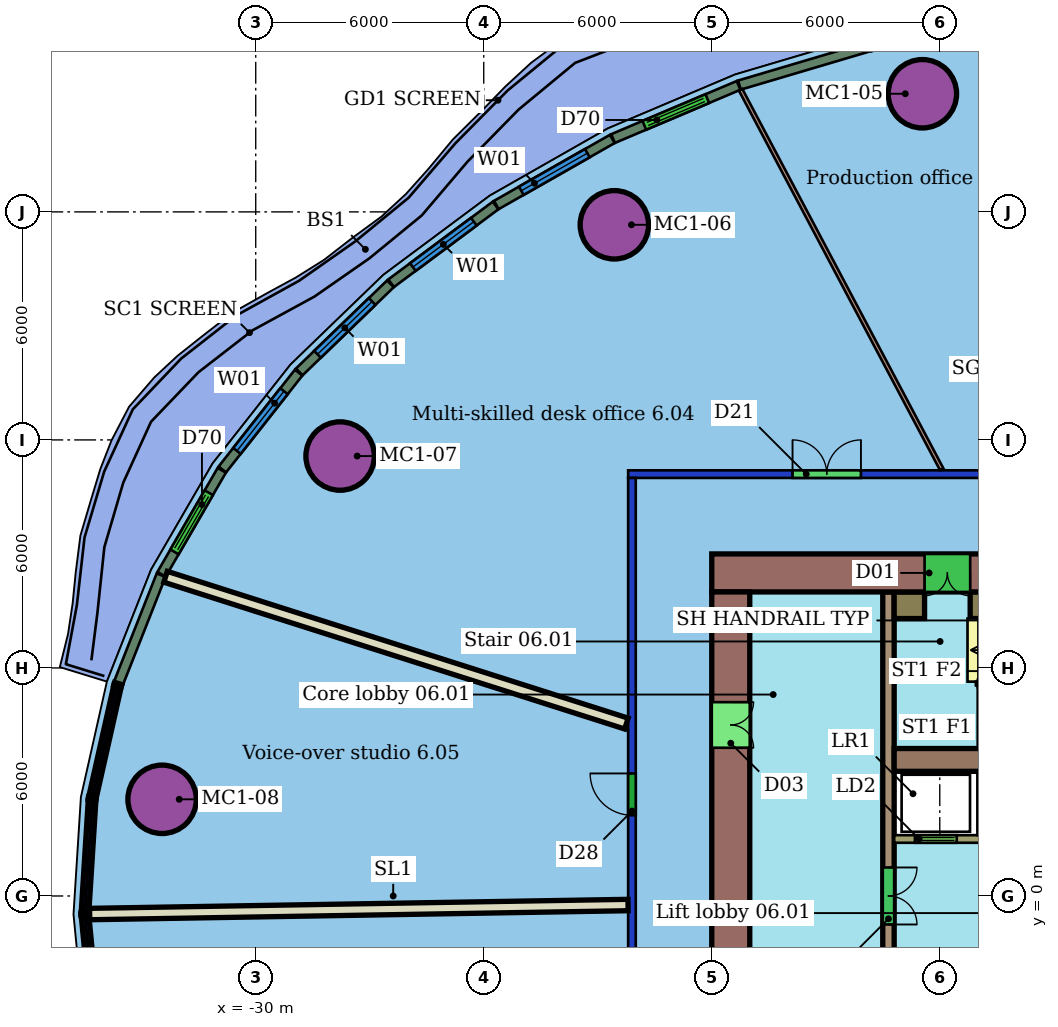
"""IFC4 building model, lengths in metres.
Left out: names, types, materials, properties, quantities, classifications, styles, units other than length and angle.
Written with IfcOpenShell. Run it as: python <this file> out.ifc"""

import sys

from ifc_helpers import new_model, si_unit, direction, frame, frame_2d, origin, origin_2d, place, context, subcontext, project, spatial, rectangle, hollow_circle, extrude, element, fill, save


model = new_model("IFC4")
c1 = context("Model", 3, precision=1e-05, world=origin(), true_north=direction((0.0, 1.0)))
c2 = subcontext(c1, "Body", "Model", "MODEL_VIEW")
j1 = project(units=[si_unit("LENGTHUNIT", "METRE"), si_unit("PLANEANGLEUNIT", "RADIAN")], contexts=[c1])
p1 = place(None, origin())
s1 = spatial("IfcSite", under=j1, at=p1, CompositionType="ELEMENT")
p2 = place(p1, origin())
s2 = spatial("IfcBuilding", under=s1, at=p2, CompositionType="ELEMENT")
p3 = place(p2, frame((0.0, 0.0, 39.7)))
s3 = spatial("IfcBuildingStorey", under=s2, at=p3, CompositionType="ELEMENT", Elevation=39.7)
for number, where, z_axis, x_axis in (
    (1, (-12.458, 21.108, 0.0), (0.0, 0.0, 1.0), (1.0, 0.0, 0.0)),
    (2, (-20.563, 17.66, 0.0), (0.0, 0.0, 1.0), (1.0, 0.0, 0.0)),
    (3, (-27.78, 11.576, 0.0), (0.0, 0.0, 1.0), (1.0, 0.0, 0.0)),
    (4, (-32.464, 2.543, 0.0), (0.0, 0.0, 1.0), (1.0, 0.0, 0.0)),
):
    element("IfcColumn", number, at=place(p3, frame(where, z_axis=z_axis, x_axis=x_axis)), inside=s3, PredefinedType="COLUMN", context=c2, shape_type="SweptSolid", body=[
        extrude(hollow_circle(Radius=0.9, WallThickness=0.06, at=origin_2d()), origin(), (0.0, 0.0, 1.0), 3.55),
    ])
p4 = place(p3, frame((-20.1, -11.0, 0.0), z_axis=(0.0, 0.0, 1.0), x_axis=(0.0, 1.0, 0.0)))
e5 = element("IfcWall", 5, at=p4, inside=s3, PredefinedType="PARTITIONING", context=c2, shape_type="SweptSolid", body=[
    extrude(rectangle(XDim=22.0, YDim=0.2, at=frame_2d((11.0, 0.0))), origin(), (0.0, 0.0, 1.0), 2.85),
])
p5 = place(p4, frame((13.124, 0.0, 0.0)))
e6 = element("IfcOpeningElement", 6, at=p5, cuts=e5, PredefinedType="OPENING", context=c2, shape_type="SweptSolid", body=[
    extrude(rectangle(XDim=1.1, YDim=2.1, at=frame_2d((0.55, 1.05))), frame((0.0, 0.11, 0.0), z_axis=(0.0, -1.0, 0.0), x_axis=(1.0, 0.0, 0.0)), (0.0, 0.0, 1.0), 0.22),
])
p6 = place(p4, frame((6.013, 0.0, 0.0)))
e7 = element("IfcOpeningElement", 7, at=p6, cuts=e5, PredefinedType="OPENING", context=c2, shape_type="SweptSolid", body=[
    extrude(rectangle(XDim=1.8, YDim=2.1, at=frame_2d((0.9, 1.05))), frame((0.0, 0.11, 0.0), z_axis=(0.0, -1.0, 0.0), x_axis=(1.0, 0.0, 0.0)), (0.0, 0.0, 1.0), 0.22),
])
p7 = place(p3, frame((-20.2, 11.1, 0.0), z_axis=(0.0, 0.0, 1.0), x_axis=(1.0, 0.0, 0.0)))
e8 = element("IfcWall", 8, at=p7, inside=s3, PredefinedType="PARTITIONING", context=c2, shape_type="SweptSolid", body=[
    extrude(rectangle(XDim=28.4, YDim=0.2, at=frame_2d((14.2, 0.0))), origin(), (0.0, 0.0, 1.0), 2.85),
])
p8 = place(p7, frame((16.718, 0.0, 0.0)))
e9 = element("IfcOpeningElement", 9, at=p8, cuts=e8, PredefinedType="OPENING", context=c2, shape_type="SweptSolid", body=[
    extrude(rectangle(XDim=1.8, YDim=2.1, at=frame_2d((0.9, 1.05))), frame((0.0, 0.11, 0.0), z_axis=(0.0, -1.0, 0.0), x_axis=(1.0, 0.0, 0.0)), (0.0, 0.0, 1.0), 0.22),
])
p9 = place(p7, frame((9.305, 0.0, 0.0)))
e10 = element("IfcOpeningElement", 10, at=p9, cuts=e8, PredefinedType="OPENING", context=c2, shape_type="SweptSolid", body=[
    extrude(rectangle(XDim=1.0, YDim=2.1, at=frame_2d((0.5, 1.05))), frame((0.0, 0.11, 0.0), z_axis=(0.0, -1.0, 0.0), x_axis=(1.0, 0.0, 0.0)), (0.0, 0.0, 1.0), 0.22),
])
p10 = place(p7, frame((4.326, 0.0, 0.0)))
e11 = element("IfcOpeningElement", 11, at=p10, cuts=e8, PredefinedType="OPENING", context=c2, shape_type="SweptSolid", body=[
    extrude(rectangle(XDim=1.8, YDim=2.1, at=frame_2d((0.9, 1.05))), frame((0.0, 0.11, 0.0), z_axis=(0.0, -1.0, 0.0), x_axis=(1.0, 0.0, 0.0)), (0.0, 0.0, 1.0), 0.22),
])
p11 = place(p3, frame((-17.241, 21.215, 0.0), z_axis=(0.0, 0.0, 1.0), x_axis=(0.468204132098, -0.883620331752, 0.0)))
e12 = element("IfcWall", 12, at=p11, inside=s3, PredefinedType="PARTITIONING", context=c2, shape_type="SweptSolid", body=[
    extrude(rectangle(XDim=11.308, YDim=0.1, at=frame_2d((5.654, 0.0))), origin(), (0.0, 0.0, 1.0), 3.55),
])
p12 = place(p3, frame((-32.372, 8.399, 0.0), z_axis=(0.0, 0.0, 1.0), x_axis=(0.952850421319, -0.303440397101, 0.0)))
e13 = element("IfcWall", 13, at=p12, inside=s3, PredefinedType="PARTITIONING", context=c2, shape_type="SweptSolid", body=[
    extrude(rectangle(XDim=12.727, YDim=0.3, at=frame_2d((6.363, 0.0))), origin(), (0.0, 0.0, 1.0), 3.55),
])
p13 = place(p3, frame((-34.37, -0.475, 0.0), z_axis=(0.0, 0.0, 1.0), x_axis=(0.999859758648, 0.016747030697, 0.0)))
e14 = element("IfcWall", 14, at=p13, inside=s3, PredefinedType="PARTITIONING", context=c2, shape_type="SweptSolid", body=[
    extrude(rectangle(XDim=14.17, YDim=0.3, at=frame_2d((7.085, 0.0))), origin(), (0.0, 0.0, 1.0), 3.55),
])
p14 = place(p3, frame((-13.818, 22.36, 0.0), z_axis=(0.0, 0.0, 1.0), x_axis=(-0.958796062101, -0.284095250399, 0.0)))
e15 = element("IfcWall", 15, at=p14, inside=s3, PredefinedType="SOLIDWALL", context=c2, shape_type="SweptSolid", body=[
    extrude(rectangle(XDim=3.603, YDim=0.25, at=frame_2d((1.802, 0.0))), origin(), (0.0, 0.0, 1.0), 3.15),
])
p15 = place(p3, frame((-17.294, 21.329, 0.0), z_axis=(0.0, 0.0, 1.0), x_axis=(-0.920777409004, -0.390088404169, 0.0)))
e16 = element("IfcWall", 16, at=p15, inside=s3, PredefinedType="SOLIDWALL", context=c2, shape_type="SweptSolid", body=[
    extrude(rectangle(XDim=3.587, YDim=0.25, at=frame_2d((1.794, 0.0))), origin(), (0.0, 0.0, 1.0), 3.15),
])
p16 = place(p15, frame((0.894, 0.0, 0.0)))
e17 = element("IfcOpeningElement", 17, at=p16, cuts=e16, PredefinedType="OPENING", context=c2, shape_type="SweptSolid", body=[
    extrude(rectangle(XDim=1.8, YDim=2.4, at=frame_2d((0.9, 1.2))), frame((0.0, 0.135, 0.0), z_axis=(0.0, -1.0, 0.0), x_axis=(1.0, 0.0, 0.0)), (0.0, 0.0, 1.0), 0.27),
])
p17 = place(p3, frame((-20.617, 19.919, 0.0), z_axis=(0.0, 0.0, 1.0), x_axis=(-0.868943789931, -0.494910789881, 0.0)))
e18 = element("IfcWall", 18, at=p17, inside=s3, PredefinedType="SOLIDWALL", context=c2, shape_type="SweptSolid", body=[
    extrude(rectangle(XDim=3.512, YDim=0.25, at=frame_2d((1.756, 0.0))), origin(), (0.0, 0.0, 1.0), 3.15),
])
p18 = place(p17, frame((0.756, 0.0, 0.8)))
e19 = element("IfcOpeningElement", 19, at=p18, cuts=e18, PredefinedType="OPENING", context=c2, shape_type="SweptSolid", body=[
    extrude(rectangle(XDim=2.0, YDim=2.2, at=frame_2d((1.0, 1.1))), frame((0.0, 0.135, 0.0), z_axis=(0.0, -1.0, 0.0), x_axis=(1.0, 0.0, 0.0)), (0.0, 0.0, 1.0), 0.27),
])
p19 = place(p3, frame((-23.689, 18.168, 0.0), z_axis=(0.0, 0.0, 1.0), x_axis=(-0.802166551417, -0.597100346498, 0.0)))
e20 = element("IfcWall", 20, at=p19, inside=s3, PredefinedType="SOLIDWALL", context=c2, shape_type="SweptSolid", body=[
    extrude(rectangle(XDim=3.426, YDim=0.25, at=frame_2d((1.713, 0.0))), origin(), (0.0, 0.0, 1.0), 3.15),
])
p20 = place(p19, frame((0.713, 0.0, 0.8)))
e21 = element("IfcOpeningElement", 21, at=p20, cuts=e20, PredefinedType="OPENING", context=c2, shape_type="SweptSolid", body=[
    extrude(rectangle(XDim=2.0, YDim=2.2, at=frame_2d((1.0, 1.1))), frame((0.0, 0.135, 0.0), z_axis=(0.0, -1.0, 0.0), x_axis=(1.0, 0.0, 0.0)), (0.0, 0.0, 1.0), 0.27),
])
p21 = place(p3, frame((-26.456, 16.107, 0.0), z_axis=(0.0, 0.0, 1.0), x_axis=(-0.719152952807, -0.694851804682, 0.0)))
e22 = element("IfcWall", 22, at=p21, inside=s3, PredefinedType="SOLIDWALL", context=c2, shape_type="SweptSolid", body=[
    extrude(rectangle(XDim=3.335, YDim=0.25, at=frame_2d((1.668, 0.0))), origin(), (0.0, 0.0, 1.0), 3.15),
])
p22 = place(p21, frame((0.668, 0.0, 0.8)))
e23 = element("IfcOpeningElement", 23, at=p22, cuts=e22, PredefinedType="OPENING", context=c2, shape_type="SweptSolid", body=[
    extrude(rectangle(XDim=2.0, YDim=2.2, at=frame_2d((1.0, 1.1))), frame((0.0, 0.135, 0.0), z_axis=(0.0, -1.0, 0.0), x_axis=(1.0, 0.0, 0.0)), (0.0, 0.0, 1.0), 0.27),
])
p23 = place(p3, frame((-28.871, 13.771, 0.0), z_axis=(0.0, 0.0, 1.0), x_axis=(-0.618897546754, -0.785471722357, 0.0)))
e24 = element("IfcWall", 24, at=p23, inside=s3, PredefinedType="SOLIDWALL", context=c2, shape_type="SweptSolid", body=[
    extrude(rectangle(XDim=3.245, YDim=0.25, at=frame_2d((1.623, 0.0))), origin(), (0.0, 0.0, 1.0), 3.15),
])
p24 = place(p23, frame((0.622, 0.0, 0.8)))
e25 = element("IfcOpeningElement", 25, at=p24, cuts=e24, PredefinedType="OPENING", context=c2, shape_type="SweptSolid", body=[
    extrude(rectangle(XDim=2.0, YDim=2.2, at=frame_2d((1.0, 1.1))), frame((0.0, 0.135, 0.0), z_axis=(0.0, -1.0, 0.0), x_axis=(1.0, 0.0, 0.0)), (0.0, 0.0, 1.0), 0.27),
])
p25 = place(p3, frame((-30.894, 11.2, 0.0), z_axis=(0.0, 0.0, 1.0), x_axis=(-0.501203693301, -0.86532933489, 0.0)))
e26 = element("IfcWall", 26, at=p25, inside=s3, PredefinedType="SOLIDWALL", context=c2, shape_type="SweptSolid", body=[
    extrude(rectangle(XDim=3.161, YDim=0.25, at=frame_2d((1.581, 0.0))), origin(), (0.0, 0.0, 1.0), 3.15),
])
p26 = place(p25, frame((0.681, 0.0, 0.0)))
e27 = element("IfcOpeningElement", 27, at=p26, cuts=e26, PredefinedType="OPENING", context=c2, shape_type="SweptSolid", body=[
    extrude(rectangle(XDim=1.8, YDim=2.4, at=frame_2d((0.9, 1.2))), frame((0.0, 0.135, 0.0), z_axis=(0.0, -1.0, 0.0), x_axis=(1.0, 0.0, 0.0)), (0.0, 0.0, 1.0), 0.27),
])
p27 = place(p3, frame((-32.49, 8.441, 0.0), z_axis=(0.0, 0.0, 1.0), x_axis=(-0.367150133135, -0.93016169548, 0.0)))
e28 = element("IfcWall", 28, at=p27, inside=s3, PredefinedType="SOLIDWALL", context=c2, shape_type="SweptSolid", body=[
    extrude(rectangle(XDim=3.05, YDim=0.25, at=frame_2d((1.525, 0.0))), origin(), (0.0, 0.0, 1.0), 3.15),
])
p28 = place(p3, frame((-6.0, 8.5, 0.0), z_axis=(0.0, 0.0, 1.0), x_axis=(-1.0, 0.0, 0.0)))
e29 = element("IfcWall", 29, at=p28, inside=s3, PredefinedType="SHEAR", context=c2, shape_type="SweptSolid", body=[
    extrude(rectangle(XDim=12.0, YDim=1.0, at=frame_2d((6.0, 0.0))), origin(), (0.0, 0.0, 1.0), 3.4),
])
p29 = place(p28, frame((5.2, 0.0, 0.0)))
e30 = element("IfcOpeningElement", 30, at=p29, cuts=e29, PredefinedType="OPENING", context=c2, shape_type="SweptSolid", body=[
    extrude(rectangle(XDim=1.2, YDim=2.1, at=frame_2d((0.6, 1.05))), frame((0.0, 0.51, 0.0), z_axis=(0.0, -1.0, 0.0), x_axis=(1.0, 0.0, 0.0)), (0.0, 0.0, 1.0), 1.02),
])
p30 = place(p3, frame((-17.5, 8.0, 0.0), z_axis=(0.0, 0.0, 1.0), x_axis=(0.0, -1.0, 0.0)))
e31 = element("IfcWall", 31, at=p30, inside=s3, PredefinedType="SHEAR", context=c2, shape_type="SweptSolid", body=[
    extrude(rectangle(XDim=16.0, YDim=1.0, at=frame_2d((8.0, 0.0))), origin(), (0.0, 0.0, 1.0), 3.4),
])
p31 = place(p30, frame((11.9, 0.0, 0.0)))
e32 = element("IfcOpeningElement", 32, at=p31, cuts=e31, PredefinedType="OPENING", context=c2, shape_type="SweptSolid", body=[
    extrude(rectangle(XDim=1.2, YDim=2.1, at=frame_2d((0.6, 1.05))), frame((0.0, 0.51, 0.0), z_axis=(0.0, -1.0, 0.0), x_axis=(1.0, 0.0, 0.0)), (0.0, 0.0, 1.0), 1.02),
])
p32 = place(p30, frame((2.9, 0.0, 0.0)))
e33 = element("IfcOpeningElement", 33, at=p32, cuts=e31, PredefinedType="OPENING", context=c2, shape_type="SweptSolid", body=[
    extrude(rectangle(XDim=1.2, YDim=2.1, at=frame_2d((0.6, 1.05))), frame((0.0, 0.51, 0.0), z_axis=(0.0, -1.0, 0.0), x_axis=(1.0, 0.0, 0.0)), (0.0, 0.0, 1.0), 1.02),
])
p33 = place(p3, frame((-13.2, 3.58, 0.0), z_axis=(0.0, 0.0, 1.0), x_axis=(1.0, 0.0, 0.0)))
e34 = element("IfcWall", 34, at=p33, inside=s3, PredefinedType="SHEAR", context=c2, shape_type="SweptSolid", body=[
    extrude(rectangle(XDim=7.2, YDim=0.6, at=frame_2d((3.6, 0.0))), origin(), (0.0, 0.0, 1.0), 3.4),
])
p34 = place(p3, frame((-13.35, 8.0, 0.0), z_axis=(0.0, 0.0, 1.0), x_axis=(0.0, -1.0, 0.0)))
e35 = element("IfcWall", 35, at=p34, inside=s3, PredefinedType="SHEAR", context=c2, shape_type="SweptSolid", body=[
    extrude(rectangle(XDim=16.0, YDim=0.3, at=frame_2d((8.0, 0.0))), origin(), (0.0, 0.0, 1.0), 3.4),
])
p35 = place(p34, frame((7.25, 0.0, 0.0)))
e36 = element("IfcOpeningElement", 36, at=p35, cuts=e35, PredefinedType="OPENING", context=c2, shape_type="SweptSolid", body=[
    extrude(rectangle(XDim=1.5, YDim=2.1, at=frame_2d((0.75, 1.05))), frame((0.0, 0.16, 0.0), z_axis=(0.0, -1.0, 0.0), x_axis=(1.0, 0.0, 0.0)), (0.0, 0.0, 1.0), 0.32),
])
p36 = place(p3, frame((-13.2, 1.5, 0.0), z_axis=(0.0, 0.0, 1.0), x_axis=(1.0, 0.0, 0.0)))
e37 = element("IfcWall", 37, at=p36, inside=s3, PredefinedType="SHEAR", context=c2, shape_type="SweptSolid", body=[
    extrude(rectangle(XDim=14.4, YDim=0.2, at=frame_2d((7.2, 0.0))), origin(), (0.0, 0.0, 1.0), 3.4),
])
p37 = place(p36, frame((0.546, 0.0, 0.0)))
e38 = element("IfcOpeningElement", 38, at=p37, cuts=e37, PredefinedType="OPENING", context=c2, shape_type="SweptSolid", body=[
    extrude(rectangle(XDim=1.1, YDim=2.1, at=frame_2d((0.55, 1.05))), frame((0.0, 0.11, 0.0), z_axis=(0.0, -1.0, 0.0), x_axis=(1.0, 0.0, 0.0)), (0.0, 0.0, 1.0), 0.22),
])
p38 = place(p36, frame((2.988, 0.0, 0.0)))
e39 = element("IfcOpeningElement", 39, at=p38, cuts=e37, PredefinedType="OPENING", context=c2, shape_type="SweptSolid", body=[
    extrude(rectangle(XDim=1.1, YDim=2.1, at=frame_2d((0.55, 1.05))), frame((0.0, 0.11, 0.0), z_axis=(0.0, -1.0, 0.0), x_axis=(1.0, 0.0, 0.0)), (0.0, 0.0, 1.0), 0.22),
])
p39 = place(p36, frame((5.429, 0.0, 0.0)))
e40 = element("IfcOpeningElement", 40, at=p39, cuts=e37, PredefinedType="OPENING", context=c2, shape_type="SweptSolid", body=[
    extrude(rectangle(XDim=1.1, YDim=2.1, at=frame_2d((0.55, 1.05))), frame((0.0, 0.11, 0.0), z_axis=(0.0, -1.0, 0.0), x_axis=(1.0, 0.0, 0.0)), (0.0, 0.0, 1.0), 0.22),
])
p40 = place(p36, frame((7.871, 0.0, 0.0)))
e41 = element("IfcOpeningElement", 41, at=p40, cuts=e37, PredefinedType="OPENING", context=c2, shape_type="SweptSolid", body=[
    extrude(rectangle(XDim=1.1, YDim=2.1, at=frame_2d((0.55, 1.05))), frame((0.0, 0.11, 0.0), z_axis=(0.0, -1.0, 0.0), x_axis=(1.0, 0.0, 0.0)), (0.0, 0.0, 1.0), 0.22),
])
p41 = place(p36, frame((11.607, 0.0, 0.0)))
e42 = element("IfcOpeningElement", 42, at=p41, cuts=e37, PredefinedType="OPENING", context=c2, shape_type="SweptSolid", body=[
    extrude(rectangle(XDim=0.9, YDim=2.1, at=frame_2d((0.45, 1.05))), frame((0.0, 0.11, 0.0), z_axis=(0.0, -1.0, 0.0), x_axis=(1.0, 0.0, 0.0)), (0.0, 0.0, 1.0), 0.22),
])
p42 = place(p36, frame((13.25, 0.0, 0.0)))
e43 = element("IfcOpeningElement", 43, at=p42, cuts=e37, PredefinedType="OPENING", context=c2, shape_type="SweptSolid", body=[
    extrude(rectangle(XDim=1.0, YDim=2.1, at=frame_2d((0.5, 1.05))), frame((0.0, 0.11, 0.0), z_axis=(0.0, -1.0, 0.0), x_axis=(1.0, 0.0, 0.0)), (0.0, 0.0, 1.0), 0.22),
])
p43 = place(p3, frame((-13.2, 7.65, 0.0), z_axis=(0.0, 0.0, 1.0), x_axis=(1.0, 0.0, 0.0)))
e44 = element("IfcWall", 44, at=p43, inside=s3, PredefinedType="SHEAR", context=c2, shape_type="SweptSolid", body=[
    extrude(rectangle(XDim=0.8, YDim=0.7, at=frame_2d((0.4, 0.0))), origin(), (0.0, 0.0, 1.0), 3.4),
])
p44 = place(p3, frame((-11.2, 7.65, 0.0), z_axis=(0.0, 0.0, 1.0), x_axis=(1.0, 0.0, 0.0)))
e45 = element("IfcWall", 45, at=p44, inside=s3, PredefinedType="SHEAR", context=c2, shape_type="SweptSolid", body=[
    extrude(rectangle(XDim=5.05, YDim=0.7, at=frame_2d((2.525, 0.0))), origin(), (0.0, 0.0, 1.0), 3.4),
])
p45 = place(p3, frame((-10.883, 1.6, 0.0), z_axis=(0.0, 0.0, 1.0), x_axis=(0.0, 1.0, 0.0)))
e46 = element("IfcWall", 46, at=p45, inside=s3, PredefinedType="SHEAR", context=c2, shape_type="SweptSolid", body=[
    extrude(rectangle(XDim=1.68, YDim=0.25, at=frame_2d((0.84, 0.0))), origin(), (0.0, 0.0, 1.0), 3.4),
])
p46 = place(p10, origin())
e47 = element("IfcDoor", 47, at=p46, inside=s3, OperationType="DOUBLE_DOOR_SINGLE_SWING", PredefinedType="DOOR", context=c2, shape_type="SweptSolid", body=[
    extrude(rectangle(XDim=1.8, YDim=2.1, at=frame_2d((0.9, 1.05))), frame((0.0, 0.025, 0.0), z_axis=(0.0, -1.0, 0.0), x_axis=(1.0, 0.0, 0.0)), (0.0, 0.0, 1.0), 0.05),
])
fill(e11, e47)
p47 = place(p5, origin())
e48 = element("IfcDoor", 48, at=p47, inside=s3, OperationType="SINGLE_SWING_RIGHT", PredefinedType="DOOR", context=c2, shape_type="SweptSolid", body=[
    extrude(rectangle(XDim=1.1, YDim=2.1, at=frame_2d((0.55, 1.05))), frame((0.0, 0.025, 0.0), z_axis=(0.0, -1.0, 0.0), x_axis=(1.0, 0.0, 0.0)), (0.0, 0.0, 1.0), 0.05),
])
fill(e6, e48)
p48 = place(p16, origin())
e49 = element("IfcDoor", 49, at=p48, inside=s3, OperationType="DOUBLE_DOOR_SLIDING", PredefinedType="DOOR", context=c2, shape_type="SweptSolid", body=[
    extrude(rectangle(XDim=1.8, YDim=2.4, at=frame_2d((0.9, 1.2))), frame((0.0, 0.025, 0.0), z_axis=(0.0, -1.0, 0.0), x_axis=(1.0, 0.0, 0.0)), (0.0, 0.0, 1.0), 0.05),
])
fill(e17, e49)
p49 = place(p18, origin())
e50 = element("IfcWindow", 50, at=p49, inside=s3, PartitioningType="SINGLE_PANEL", PredefinedType="WINDOW", context=c2, shape_type="SweptSolid", body=[
    extrude(rectangle(XDim=2.0, YDim=2.2, at=frame_2d((1.0, 1.1))), frame((0.0, 0.03, 0.0), z_axis=(0.0, -1.0, 0.0), x_axis=(1.0, 0.0, 0.0)), (0.0, 0.0, 1.0), 0.06),
])
fill(e19, e50)
p50 = place(p20, origin())
e51 = element("IfcWindow", 51, at=p50, inside=s3, PartitioningType="SINGLE_PANEL", PredefinedType="WINDOW", context=c2, shape_type="SweptSolid", body=[
    extrude(rectangle(XDim=2.0, YDim=2.2, at=frame_2d((1.0, 1.1))), frame((0.0, 0.03, 0.0), z_axis=(0.0, -1.0, 0.0), x_axis=(1.0, 0.0, 0.0)), (0.0, 0.0, 1.0), 0.06),
])
fill(e21, e51)
p51 = place(p22, origin())
e52 = element("IfcWindow", 52, at=p51, inside=s3, PartitioningType="SINGLE_PANEL", PredefinedType="WINDOW", context=c2, shape_type="SweptSolid", body=[
    extrude(rectangle(XDim=2.0, YDim=2.2, at=frame_2d((1.0, 1.1))), frame((0.0, 0.03, 0.0), z_axis=(0.0, -1.0, 0.0), x_axis=(1.0, 0.0, 0.0)), (0.0, 0.0, 1.0), 0.06),
])
fill(e23, e52)
p52 = place(p24, origin())
e53 = element("IfcWindow", 53, at=p52, inside=s3, PartitioningType="SINGLE_PANEL", PredefinedType="WINDOW", context=c2, shape_type="SweptSolid", body=[
    extrude(rectangle(XDim=2.0, YDim=2.2, at=frame_2d((1.0, 1.1))), frame((0.0, 0.03, 0.0), z_axis=(0.0, -1.0, 0.0), x_axis=(1.0, 0.0, 0.0)), (0.0, 0.0, 1.0), 0.06),
])
fill(e25, e53)
p53 = place(p26, origin())
e54 = element("IfcDoor", 54, at=p53, inside=s3, OperationType="DOUBLE_DOOR_SLIDING", PredefinedType="DOOR", context=c2, shape_type="SweptSolid", body=[
    extrude(rectangle(XDim=1.8, YDim=2.4, at=frame_2d((0.9, 1.2))), frame((0.0, 0.025, 0.0), z_axis=(0.0, -1.0, 0.0), x_axis=(1.0, 0.0, 0.0)), (0.0, 0.0, 1.0), 0.05),
])
fill(e27, e54)
p54 = place(p29, origin())
e55 = element("IfcDoor", 55, at=p54, inside=s3, OperationType="DOUBLE_DOOR_SINGLE_SWING", PredefinedType="NOTDEFINED", context=c2, shape_type="SweptSolid", body=[
    extrude(rectangle(XDim=1.2, YDim=2.1, at=frame_2d((0.6, 1.05))), frame((0.0, 0.025, 0.0), z_axis=(0.0, -1.0, 0.0), x_axis=(1.0, 0.0, 0.0)), (0.0, 0.0, 1.0), 0.05),
])
fill(e30, e55)
p55 = place(p32, origin())
e56 = element("IfcDoor", 56, at=p55, inside=s3, OperationType="DOUBLE_DOOR_SINGLE_SWING", PredefinedType="NOTDEFINED", context=c2, shape_type="SweptSolid", body=[
    extrude(rectangle(XDim=1.2, YDim=2.1, at=frame_2d((0.6, 1.05))), frame((0.0, 0.025, 0.0), z_axis=(0.0, -1.0, 0.0), x_axis=(1.0, 0.0, 0.0)), (0.0, 0.0, 1.0), 0.05),
])
fill(e33, e56)
p56 = place(p35, origin())
e57 = element("IfcDoor", 57, at=p56, inside=s3, OperationType="DOUBLE_DOOR_SINGLE_SWING", PredefinedType="NOTDEFINED", context=c2, shape_type="SweptSolid", body=[
    extrude(rectangle(XDim=1.5, YDim=2.1, at=frame_2d((0.75, 1.05))), frame((0.0, 0.025, 0.0), z_axis=(0.0, -1.0, 0.0), x_axis=(1.0, 0.0, 0.0)), (0.0, 0.0, 1.0), 0.05),
])
fill(e36, e57)
p57 = place(p37, origin())
e58 = element("IfcDoor", 58, at=p57, inside=s3, OperationType="DOUBLE_DOOR_SLIDING", PredefinedType="NOTDEFINED", context=c2, shape_type="SweptSolid", body=[
    extrude(rectangle(XDim=1.1, YDim=2.1, at=frame_2d((0.55, 1.05))), frame((0.0, 0.025, 0.0), z_axis=(0.0, -1.0, 0.0), x_axis=(1.0, 0.0, 0.0)), (0.0, 0.0, 1.0), 0.05),
])
fill(e38, e58)
save(model, sys.argv[1])
